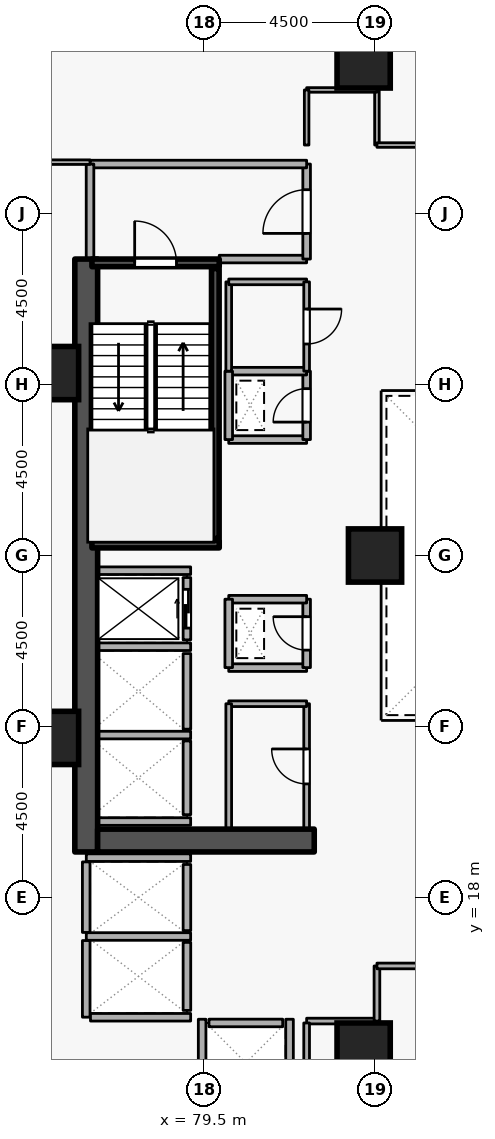
"""IFC4 building model, lengths in metres.
Left out: names, types, materials, properties, quantities, classifications, styles, units other than length and angle.
Written with IfcOpenShell. Run it as: python <this file> out.ifc"""

import sys

from ifc_helpers import new_model, si_unit, direction, frame, frame_2d, origin, origin_2d, place, context, subcontext, project, spatial, rectangle, extrude, element, fill, save


model = new_model("IFC4")
c1 = context("Model", 3, precision=1e-05, world=origin(), true_north=direction((0.0, 1.0)))
c2 = subcontext(c1, "Body", "Model", "MODEL_VIEW")
j1 = project(units=[si_unit("LENGTHUNIT", "METRE"), si_unit("PLANEANGLEUNIT", "RADIAN")], contexts=[c1])
p1 = place(None, origin())
s1 = spatial("IfcSite", under=j1, at=p1, CompositionType="ELEMENT")
p2 = place(p1, origin())
s2 = spatial("IfcBuilding", under=s1, at=p2, CompositionType="ELEMENT")
p3 = place(p2, frame((0.0, 0.0, 57.3)))
s3 = spatial("IfcBuildingStorey", under=s2, at=p3, CompositionType="ELEMENT", Elevation=57.3)
p4 = place(p3, frame((76.4, 19.2, 0.0), z_axis=(0.0, 0.0, 1.0), x_axis=(0.0, 1.0, 0.0)))
e1 = element("IfcWall", 1, at=p4, inside=s3, PredefinedType="SHEAR", context=c2, shape_type="SweptSolid", body=[
    extrude(rectangle(XDim=15.6, YDim=0.6, at=frame_2d((7.8, 0.0))), origin(), (0.0, 0.0, 1.0), 3.6),
])
p5 = place(p3, frame((76.7, 19.5, 0.0), z_axis=(0.0, 0.0, 1.0), x_axis=(1.0, 0.0, 0.0)))
e2 = element("IfcWall", 2, at=p5, inside=s3, PredefinedType="SHEAR", context=c2, shape_type="SweptSolid", body=[
    extrude(rectangle(XDim=5.7, YDim=0.6, at=frame_2d((2.85, 0.0))), origin(), (0.0, 0.0, 1.0), 3.6),
])
for number, where, z_axis, x_axis in (
    (3, (83.7, 14.0, 0.0), (0.0, 0.0, 1.0), (1.0, 0.0, 0.0)),
    (4, (83.7, 40.0, 0.0), (0.0, 0.0, 1.0), (1.0, 0.0, 0.0)),
    (5, (75.5, 22.2, 0.0), (0.0, 0.0, 1.0), (1.0, 0.0, 0.0)),
    (6, (75.5, 31.8, 0.0), (0.0, 0.0, 1.0), (1.0, 0.0, 0.0)),
    (7, (84.0, 27.0, 0.0), (0.0, 0.0, 1.0), (1.0, 0.0, 0.0)),
):
    element("IfcColumn", number, at=place(p3, frame(where, z_axis=z_axis, x_axis=x_axis)), inside=s3, PredefinedType="COLUMN", context=c2, shape_type="SweptSolid", body=[
        extrude(rectangle(XDim=1.4, YDim=1.4, at=origin_2d()), origin(), (0.0, 0.0, 1.0), 3.6),
    ])
p6 = place(p3, frame((79.05, 24.78, 0.0), z_axis=(0.0, 0.0, 1.0), x_axis=(0.0, 1.0, 0.0)))
e8 = element("IfcWall", 8, at=p6, inside=s3, PredefinedType="STANDARD", context=c2, shape_type="SweptSolid", body=[
    extrude(rectangle(XDim=1.64, YDim=0.2, at=frame_2d((0.82, 0.0))), origin(), (0.0, 0.0, 1.0), 3.34),
])
p7 = place(p6, frame((0.31, 0.0, 0.0)))
e9 = element("IfcOpeningElement", 9, at=p7, cuts=e8, PredefinedType="OPENING", context=c2, shape_type="SweptSolid", body=[
    extrude(rectangle(XDim=1.02, YDim=2.06, at=frame_2d((0.51, 1.03))), frame((0.0, 0.11, 0.0), z_axis=(0.0, -1.0, 0.0), x_axis=(1.0, 0.0, 0.0)), (0.0, 0.0, 1.0), 0.22),
])
p8 = place(p3, frame((79.05, 22.43, 0.0), z_axis=(0.0, 0.0, 1.0), x_axis=(0.0, 1.0, 0.0)))
e10 = element("IfcWall", 10, at=p8, inside=s3, PredefinedType="STANDARD", context=c2, shape_type="SweptSolid", body=[
    extrude(rectangle(XDim=1.99, YDim=0.2, at=frame_2d((0.995, 0.0))), origin(), (0.0, 0.0, 1.0), 3.34),
])
p9 = place(p3, frame((79.05, 20.18, 0.0), z_axis=(0.0, 0.0, 1.0), x_axis=(0.0, 1.0, 0.0)))
e11 = element("IfcWall", 11, at=p9, inside=s3, PredefinedType="STANDARD", context=c2, shape_type="SweptSolid", body=[
    extrude(rectangle(XDim=1.94, YDim=0.2, at=frame_2d((0.97, 0.0))), origin(), (0.0, 0.0, 1.0), 3.34),
])
p10 = place(p3, frame((79.05, 17.13, 0.0), z_axis=(0.0, 0.0, 1.0), x_axis=(0.0, 1.0, 0.0)))
e12 = element("IfcWall", 12, at=p10, inside=s3, PredefinedType="STANDARD", context=c2, shape_type="SweptSolid", body=[
    extrude(rectangle(XDim=1.74, YDim=0.2, at=frame_2d((0.87, 0.0))), origin(), (0.0, 0.0, 1.0), 3.34),
])
p11 = place(p3, frame((79.05, 15.03, 0.0), z_axis=(0.0, 0.0, 1.0), x_axis=(0.0, 1.0, 0.0)))
e13 = element("IfcWall", 13, at=p11, inside=s3, PredefinedType="STANDARD", context=c2, shape_type="SweptSolid", body=[
    extrude(rectangle(XDim=1.79, YDim=0.2, at=frame_2d((0.895, 0.0))), origin(), (0.0, 0.0, 1.0), 3.34),
])
p12 = place(p3, frame((79.63, 14.7, 0.0), z_axis=(0.0, 0.0, 1.0), x_axis=(1.0, 0.0, 0.0)))
e14 = element("IfcWall", 14, at=p12, inside=s3, PredefinedType="STANDARD", context=c2, shape_type="SweptSolid", body=[
    extrude(rectangle(XDim=1.94, YDim=0.2, at=frame_2d((0.97, 0.0))), origin(), (0.0, 0.0, 1.0), 3.34),
])
for number, where, z_axis, x_axis in (
    (15, (76.712, 26.6, 0.0), (0.0, 0.0, 1.0), (1.0, 0.0, 0.0)),
    (16, (76.712, 24.6, 0.0), (0.0, 0.0, 1.0), (1.0, 0.0, 0.0)),
    (17, (76.712, 22.275, 0.0), (0.0, 0.0, 1.0), (1.0, 0.0, 0.0)),
    (18, (76.712, 20.0, 0.0), (0.0, 0.0, 1.0), (1.0, 0.0, 0.0)),
):
    element("IfcWall", number, at=place(p3, frame(where, z_axis=z_axis, x_axis=x_axis)), inside=s3, PredefinedType="STANDARD", context=c2, shape_type="SweptSolid", body=[
        extrude(rectangle(XDim=2.436, YDim=0.2, at=frame_2d((1.218, 0.0))), origin(), (0.0, 0.0, 1.0), 3.34),
    ])
p13 = place(p3, frame((76.402, 19.05, 0.0), z_axis=(0.0, 0.0, 1.0), x_axis=(1.0, 0.0, 0.0)))
e19 = element("IfcWall", 19, at=p13, inside=s3, PredefinedType="STANDARD", context=c2, shape_type="SweptSolid", body=[
    extrude(rectangle(XDim=2.746, YDim=0.2, at=frame_2d((1.373, 0.0))), origin(), (0.0, 0.0, 1.0), 2.545),
])
p14 = place(p3, frame((76.402, 16.975, 0.0), z_axis=(0.0, 0.0, 1.0), x_axis=(1.0, 0.0, 0.0)))
e20 = element("IfcWall", 20, at=p14, inside=s3, PredefinedType="STANDARD", context=c2, shape_type="SweptSolid", body=[
    extrude(rectangle(XDim=2.746, YDim=0.2, at=frame_2d((1.373, 0.0))), origin(), (0.0, 0.0, 1.0), 3.34),
])
p15 = place(p3, frame((76.4, 14.852, 0.0), z_axis=(0.0, 0.0, 1.0), x_axis=(0.0, 1.0, 0.0)))
e21 = element("IfcWall", 21, at=p15, inside=s3, PredefinedType="STANDARD", context=c2, shape_type="SweptSolid", body=[
    extrude(rectangle(XDim=2.016, YDim=0.2, at=frame_2d((1.008, 0.0))), origin(), (0.0, 0.0, 1.0), 3.34),
])
p16 = place(p3, frame((76.4, 17.082, 0.0), z_axis=(0.0, 0.0, 1.0), x_axis=(0.0, 1.0, 0.0)))
e22 = element("IfcWall", 22, at=p16, inside=s3, PredefinedType="STANDARD", context=c2, shape_type="SweptSolid", body=[
    extrude(rectangle(XDim=1.856, YDim=0.2, at=frame_2d((0.928, 0.0))), origin(), (0.0, 0.0, 1.0), 3.34),
])
p17 = place(p3, frame((76.512, 14.85, 0.0), z_axis=(0.0, 0.0, 1.0), x_axis=(1.0, 0.0, 0.0)))
e23 = element("IfcWall", 23, at=p17, inside=s3, PredefinedType="STANDARD", context=c2, shape_type="SweptSolid", body=[
    extrude(rectangle(XDim=2.636, YDim=0.2, at=frame_2d((1.318, 0.0))), origin(), (0.0, 0.0, 1.0), 3.34),
])
for number, where, z_axis, x_axis in (
    (24, (81.75, 12.612, 0.0), (0.0, 0.0, 1.0), (0.0, 1.0, 0.0)),
    (25, (79.45, 12.612, 0.0), (0.0, 0.0, 1.0), (0.0, 1.0, 0.0)),
):
    element("IfcWall", number, at=place(p3, frame(where, z_axis=z_axis, x_axis=x_axis)), inside=s3, PredefinedType="STANDARD", context=c2, shape_type="SweptSolid", body=[
        extrude(rectangle(XDim=2.186, YDim=0.2, at=frame_2d((1.093, 0.0))), origin(), (0.0, 0.0, 1.0), 3.34),
    ])
p18 = place(p3, frame((76.55, 34.7, 0.0), z_axis=(0.0, 0.0, 1.0), x_axis=(1.0, 0.0, 0.0)))
e26 = element("IfcWall", 26, at=p18, inside=s3, PredefinedType="SHEAR", context=c2, shape_type="SweptSolid", body=[
    extrude(rectangle(XDim=3.35, YDim=0.2, at=frame_2d((1.675, 0.0))), origin(), (0.0, 0.0, 1.0), 3.6),
])
p19 = place(p18, frame((1.125, 0.0, 0.0)))
e27 = element("IfcOpeningElement", 27, at=p19, cuts=e26, PredefinedType="OPENING", context=c2, shape_type="SweptSolid", body=[
    extrude(rectangle(XDim=1.1, YDim=2.1, at=frame_2d((0.55, 1.05))), frame((0.0, 0.11, 0.0), z_axis=(0.0, -1.0, 0.0), x_axis=(1.0, 0.0, 0.0)), (0.0, 0.0, 1.0), 0.22),
])
p20 = place(p3, frame((79.9, 27.3, 0.0), z_axis=(0.0, 0.0, 1.0), x_axis=(-1.0, 0.0, 0.0)))
e28 = element("IfcWall", 28, at=p20, inside=s3, PredefinedType="SHEAR", context=c2, shape_type="SweptSolid", body=[
    extrude(rectangle(XDim=3.35, YDim=0.2, at=frame_2d((1.675, 0.0))), origin(), (0.0, 0.0, 1.0), 3.6),
])
p21 = place(p3, frame((79.797, 27.45, 0.0), z_axis=(0.0, 0.0, 1.0), x_axis=(0.0, 1.0, 0.0)))
e29 = element("IfcWall", 29, at=p21, inside=s3, PredefinedType="SHEAR", context=c2, shape_type="SweptSolid", body=[
    extrude(rectangle(XDim=7.1, YDim=0.2, at=frame_2d((3.55, 0.0))), origin(), (0.0, 0.0, 1.0), 3.6),
])
p22 = place(p3, frame((79.9, 34.8, 0.0), z_axis=(0.0, 0.0, 1.0), x_axis=(1.0, 0.0, 0.0)))
e30 = element("IfcWall", 30, at=p22, inside=s3, PredefinedType="STANDARD", context=c2, shape_type="SweptSolid", body=[
    extrude(rectangle(XDim=2.3, YDim=0.2, at=frame_2d((1.15, 0.0))), origin(), (0.0, 0.0, 1.0), 2.545),
])
p23 = place(p3, frame((82.2, 34.8, 0.0), z_axis=(0.0, 0.0, 1.0), x_axis=(0.0, 1.0, 0.0)))
e31 = element("IfcWall", 31, at=p23, inside=s3, PredefinedType="STANDARD", context=c2, shape_type="SweptSolid", body=[
    extrude(rectangle(XDim=2.5, YDim=0.2, at=frame_2d((1.25, 0.0))), origin(), (0.0, 0.0, 1.0), 3.34),
])
p24 = place(p23, frame((0.675, 0.0, 0.0)))
e32 = element("IfcOpeningElement", 32, at=p24, cuts=e31, PredefinedType="OPENING", context=c2, shape_type="SweptSolid", body=[
    extrude(rectangle(XDim=1.15, YDim=2.1, at=frame_2d((0.575, 1.05))), frame((0.0, 0.11, 0.0), z_axis=(0.0, -1.0, 0.0), x_axis=(1.0, 0.0, 0.0)), (0.0, 0.0, 1.0), 0.22),
])
p25 = place(p3, frame((82.2, 37.3, 0.0), z_axis=(0.0, 0.0, 1.0), x_axis=(-1.0, 0.0, 0.0)))
e33 = element("IfcWall", 33, at=p25, inside=s3, PredefinedType="STANDARD", context=c2, shape_type="SweptSolid", body=[
    extrude(rectangle(XDim=5.7, YDim=0.2, at=frame_2d((2.85, 0.0))), origin(), (0.0, 0.0, 1.0), 3.34),
])
p26 = place(p3, frame((76.5, 37.3, 0.0), z_axis=(0.0, 0.0, 1.0), x_axis=(0.0, -1.0, 0.0)))
e34 = element("IfcWall", 34, at=p26, inside=s3, PredefinedType="STANDARD", context=c2, shape_type="SweptSolid", body=[
    extrude(rectangle(XDim=2.5, YDim=0.2, at=frame_2d((1.25, 0.0))), origin(), (0.0, 0.0, 1.0), 3.34),
])
p27 = place(p3, frame((80.15, 24.05, 0.0), z_axis=(0.0, 0.0, 1.0), x_axis=(1.0, 0.0, 0.0)))
e35 = element("IfcWall", 35, at=p27, inside=s3, PredefinedType="STANDARD", context=c2, shape_type="SweptSolid", body=[
    extrude(rectangle(XDim=2.05, YDim=0.2, at=frame_2d((1.025, 0.0))), origin(), (0.0, 0.0, 1.0), 3.34),
])
p28 = place(p3, frame((82.2, 24.05, 0.0), z_axis=(0.0, 0.0, 1.0), x_axis=(0.0, 1.0, 0.0)))
e36 = element("IfcWall", 36, at=p28, inside=s3, PredefinedType="STANDARD", context=c2, shape_type="SweptSolid", body=[
    extrude(rectangle(XDim=1.8, YDim=0.2, at=frame_2d((0.9, 0.0))), origin(), (0.0, 0.0, 1.0), 3.34),
])
p29 = place(p28, frame((0.46, 0.0, 0.0)))
e37 = element("IfcOpeningElement", 37, at=p29, cuts=e36, PredefinedType="OPENING", context=c2, shape_type="SweptSolid", body=[
    extrude(rectangle(XDim=0.88, YDim=2.04, at=frame_2d((0.44, 1.02))), frame((0.0, 0.11, 0.0), z_axis=(0.0, -1.0, 0.0), x_axis=(1.0, 0.0, 0.0)), (0.0, 0.0, 1.0), 0.22),
])
p30 = place(p3, frame((82.2, 25.85, 0.0), z_axis=(0.0, 0.0, 1.0), x_axis=(-1.0, 0.0, 0.0)))
e38 = element("IfcWall", 38, at=p30, inside=s3, PredefinedType="STANDARD", context=c2, shape_type="SweptSolid", body=[
    extrude(rectangle(XDim=2.05, YDim=0.2, at=frame_2d((1.025, 0.0))), origin(), (0.0, 0.0, 1.0), 3.34),
])
p31 = place(p3, frame((80.15, 25.85, 0.0), z_axis=(0.0, 0.0, 1.0), x_axis=(0.0, -1.0, 0.0)))
e39 = element("IfcWall", 39, at=p31, inside=s3, PredefinedType="STANDARD", context=c2, shape_type="SweptSolid", body=[
    extrude(rectangle(XDim=1.8, YDim=0.2, at=frame_2d((0.9, 0.0))), origin(), (0.0, 0.0, 1.0), 3.34),
])
p32 = place(p3, frame((80.15, 30.05, 0.0), z_axis=(0.0, 0.0, 1.0), x_axis=(1.0, 0.0, 0.0)))
e40 = element("IfcWall", 40, at=p32, inside=s3, PredefinedType="STANDARD", context=c2, shape_type="SweptSolid", body=[
    extrude(rectangle(XDim=2.05, YDim=0.2, at=frame_2d((1.025, 0.0))), origin(), (0.0, 0.0, 1.0), 3.34),
])
p33 = place(p3, frame((82.2, 30.05, 0.0), z_axis=(0.0, 0.0, 1.0), x_axis=(0.0, 1.0, 0.0)))
e41 = element("IfcWall", 41, at=p33, inside=s3, PredefinedType="STANDARD", context=c2, shape_type="SweptSolid", body=[
    extrude(rectangle(XDim=1.8, YDim=0.2, at=frame_2d((0.9, 0.0))), origin(), (0.0, 0.0, 1.0), 3.34),
])
p34 = place(p33, frame((0.46, 0.0, 0.0)))
e42 = element("IfcOpeningElement", 42, at=p34, cuts=e41, PredefinedType="OPENING", context=c2, shape_type="SweptSolid", body=[
    extrude(rectangle(XDim=0.88, YDim=2.04, at=frame_2d((0.44, 1.02))), frame((0.0, 0.11, 0.0), z_axis=(0.0, -1.0, 0.0), x_axis=(1.0, 0.0, 0.0)), (0.0, 0.0, 1.0), 0.22),
])
p35 = place(p3, frame((82.2, 31.85, 0.0), z_axis=(0.0, 0.0, 1.0), x_axis=(-1.0, 0.0, 0.0)))
e43 = element("IfcWall", 43, at=p35, inside=s3, PredefinedType="STANDARD", context=c2, shape_type="SweptSolid", body=[
    extrude(rectangle(XDim=2.05, YDim=0.2, at=frame_2d((1.025, 0.0))), origin(), (0.0, 0.0, 1.0), 3.34),
])
p36 = place(p3, frame((80.15, 31.85, 0.0), z_axis=(0.0, 0.0, 1.0), x_axis=(0.0, -1.0, 0.0)))
e44 = element("IfcWall", 44, at=p36, inside=s3, PredefinedType="STANDARD", context=c2, shape_type="SweptSolid", body=[
    extrude(rectangle(XDim=1.8, YDim=0.2, at=frame_2d((0.9, 0.0))), origin(), (0.0, 0.0, 1.0), 3.34),
])
p37 = place(p3, frame((82.2, 19.8, 0.0), z_axis=(0.0, 0.0, 1.0), x_axis=(0.0, 1.0, 0.0)))
e45 = element("IfcWall", 45, at=p37, inside=s3, PredefinedType="PARTITIONING", context=c2, shape_type="SweptSolid", body=[
    extrude(rectangle(XDim=3.3, YDim=0.15, at=frame_2d((1.65, 0.0))), origin(), (0.0, 0.0, 1.0), 3.34),
])
p38 = place(p37, frame((1.19, 0.0, 0.0)))
e46 = element("IfcOpeningElement", 46, at=p38, cuts=e45, PredefinedType="OPENING", context=c2, shape_type="SweptSolid", body=[
    extrude(rectangle(XDim=0.92, YDim=2.08, at=frame_2d((0.46, 1.04))), frame((0.0, 0.085, 0.0), z_axis=(0.0, -1.0, 0.0), x_axis=(1.0, 0.0, 0.0)), (0.0, 0.0, 1.0), 0.17),
])
p39 = place(p3, frame((82.2, 23.1, 0.0), z_axis=(0.0, 0.0, 1.0), x_axis=(-1.0, 0.0, 0.0)))
e47 = element("IfcWall", 47, at=p39, inside=s3, PredefinedType="PARTITIONING", context=c2, shape_type="SweptSolid", body=[
    extrude(rectangle(XDim=2.05, YDim=0.15, at=frame_2d((1.025, 0.0))), origin(), (0.0, 0.0, 1.0), 3.34),
])
p40 = place(p3, frame((80.15, 23.1, 0.0), z_axis=(0.0, 0.0, 1.0), x_axis=(0.0, -1.0, 0.0)))
e48 = element("IfcWall", 48, at=p40, inside=s3, PredefinedType="PARTITIONING", context=c2, shape_type="SweptSolid", body=[
    extrude(rectangle(XDim=3.3, YDim=0.15, at=frame_2d((1.65, 0.0))), origin(), (0.0, 0.0, 1.0), 3.34),
])
p41 = place(p3, frame((80.15, 31.85, 0.0), z_axis=(0.0, 0.0, 1.0), x_axis=(0.0, 1.0, 0.0)))
e49 = element("IfcWall", 49, at=p41, inside=s3, PredefinedType="PARTITIONING", context=c2, shape_type="SweptSolid", body=[
    extrude(rectangle(XDim=2.35, YDim=0.15, at=frame_2d((1.175, 0.0))), origin(), (0.0, 0.0, 1.0), 3.34),
])
p42 = place(p3, frame((80.15, 34.2, 0.0), z_axis=(0.0, 0.0, 1.0), x_axis=(1.0, 0.0, 0.0)))
e50 = element("IfcWall", 50, at=p42, inside=s3, PredefinedType="PARTITIONING", context=c2, shape_type="SweptSolid", body=[
    extrude(rectangle(XDim=2.05, YDim=0.15, at=frame_2d((1.025, 0.0))), origin(), (0.0, 0.0, 1.0), 2.545),
])
p43 = place(p3, frame((82.2, 34.2, 0.0), z_axis=(0.0, 0.0, 1.0), x_axis=(0.0, -1.0, 0.0)))
e51 = element("IfcWall", 51, at=p43, inside=s3, PredefinedType="PARTITIONING", context=c2, shape_type="SweptSolid", body=[
    extrude(rectangle(XDim=2.35, YDim=0.15, at=frame_2d((1.175, 0.0))), origin(), (0.0, 0.0, 1.0), 3.34),
])
p44 = place(p43, frame((0.715, 0.0, 0.0)))
e52 = element("IfcOpeningElement", 52, at=p44, cuts=e51, PredefinedType="OPENING", context=c2, shape_type="SweptSolid", body=[
    extrude(rectangle(XDim=0.92, YDim=2.08, at=frame_2d((0.46, 1.04))), frame((0.0, 0.085, 0.0), z_axis=(0.0, -1.0, 0.0), x_axis=(1.0, 0.0, 0.0)), (0.0, 0.0, 1.0), 0.17),
])
p45 = place(p3, frame((82.2, 14.75, 0.0), z_axis=(0.0, 0.0, 1.0), x_axis=(1.0, 0.0, 0.0)))
e53 = element("IfcWall", 53, at=p45, inside=s3, PredefinedType="PARTITIONING", context=c2, shape_type="SweptSolid", body=[
    extrude(rectangle(XDim=1.85, YDim=0.15, at=frame_2d((0.925, 0.0))), origin(), (0.0, 0.0, 1.0), 3.34),
])
p46 = place(p3, frame((84.05, 14.75, 0.0), z_axis=(0.0, 0.0, 1.0), x_axis=(0.0, 1.0, 0.0)))
e54 = element("IfcWall", 54, at=p46, inside=s3, PredefinedType="PARTITIONING", context=c2, shape_type="SweptSolid", body=[
    extrude(rectangle(XDim=1.45, YDim=0.15, at=frame_2d((0.725, 0.0))), origin(), (0.0, 0.0, 1.0), 3.34),
])
p47 = place(p3, frame((84.05, 16.2, 0.0), z_axis=(0.0, 0.0, 1.0), x_axis=(1.0, 0.0, 0.0)))
e55 = element("IfcWall", 55, at=p47, inside=s3, PredefinedType="PARTITIONING", context=c2, shape_type="SweptSolid", body=[
    extrude(rectangle(XDim=4.45, YDim=0.15, at=frame_2d((2.225, 0.0))), origin(), (0.0, 0.0, 1.0), 3.34),
])
p48 = place(p47, frame((1.575, 0.0, 0.0)))
e56 = element("IfcOpeningElement", 56, at=p48, cuts=e55, PredefinedType="OPENING", context=c2, shape_type="SweptSolid", body=[
    extrude(rectangle(XDim=1.3, YDim=2.12, at=frame_2d((0.65, 1.06))), frame((0.0, 0.085, 0.0), z_axis=(0.0, -1.0, 0.0), x_axis=(1.0, 0.0, 0.0)), (0.0, 0.0, 1.0), 0.17),
])
p49 = place(p3, frame((82.2, 12.4, 0.0), z_axis=(0.0, 0.0, 1.0), x_axis=(0.0, 1.0, 0.0)))
e57 = element("IfcWall", 57, at=p49, inside=s3, PredefinedType="PARTITIONING", context=c2, shape_type="SweptSolid", body=[
    extrude(rectangle(XDim=2.3, YDim=0.15, at=frame_2d((1.15, 0.0))), origin(), (0.0, 0.0, 1.0), 3.34),
])
p50 = place(p3, frame((84.05, 37.8, 0.0), z_axis=(0.0, 0.0, 1.0), x_axis=(0.0, 1.0, 0.0)))
e58 = element("IfcWall", 58, at=p50, inside=s3, PredefinedType="PARTITIONING", context=c2, shape_type="SweptSolid", body=[
    extrude(rectangle(XDim=1.45, YDim=0.12, at=frame_2d((0.725, 0.0))), origin(), (0.0, 0.0, 1.0), 3.34),
])
p51 = place(p3, frame((84.05, 39.25, 0.0), z_axis=(0.0, 0.0, 1.0), x_axis=(-1.0, 0.0, 0.0)))
e59 = element("IfcWall", 59, at=p51, inside=s3, PredefinedType="PARTITIONING", context=c2, shape_type="SweptSolid", body=[
    extrude(rectangle(XDim=1.85, YDim=0.12, at=frame_2d((0.925, 0.0))), origin(), (0.0, 0.0, 1.0), 3.34),
])
p52 = place(p3, frame((82.2, 39.25, 0.0), z_axis=(0.0, 0.0, 1.0), x_axis=(0.0, -1.0, 0.0)))
e60 = element("IfcWall", 60, at=p52, inside=s3, PredefinedType="PARTITIONING", context=c2, shape_type="SweptSolid", body=[
    extrude(rectangle(XDim=1.45, YDim=0.12, at=frame_2d((0.725, 0.0))), origin(), (0.0, 0.0, 1.0), 3.34),
])
p53 = place(p3, frame((76.5, 37.35, 0.0), z_axis=(0.0, 0.0, 1.0), x_axis=(-1.0, 0.0, 0.0)))
e61 = element("IfcWall", 61, at=p53, inside=s3, PredefinedType="PARTITIONING", context=c2, shape_type="SweptSolid", body=[
    extrude(rectangle(XDim=6.22, YDim=0.12, at=frame_2d((3.11, 0.0))), origin(), (0.0, 0.0, 1.0), 3.34),
])
p54 = place(p3, frame((88.5, 37.8, 0.0), z_axis=(0.0, 0.0, 1.0), x_axis=(-1.0, 0.0, 0.0)))
e62 = element("IfcWall", 62, at=p54, inside=s3, PredefinedType="PARTITIONING", context=c2, shape_type="SweptSolid", body=[
    extrude(rectangle(XDim=4.45, YDim=0.12, at=frame_2d((2.225, 0.0))), origin(), (0.0, 0.0, 1.0), 3.34),
])
p55 = place(p54, frame((1.7, 0.0, 0.0)))
e63 = element("IfcOpeningElement", 63, at=p55, cuts=e62, PredefinedType="OPENING", context=c2, shape_type="SweptSolid", body=[
    extrude(rectangle(XDim=1.05, YDim=2.1, at=frame_2d((0.525, 1.05))), frame((0.0, 0.07, 0.0), z_axis=(0.0, -1.0, 0.0), x_axis=(1.0, 0.0, 0.0)), (0.0, 0.0, 1.0), 0.14),
])
p56 = place(p7, origin())
e64 = element("IfcDoor", 64, at=p56, inside=s3, OperationType="SLIDING_TO_LEFT", PredefinedType="DOOR", context=c2, shape_type="SweptSolid", body=[
    extrude(rectangle(XDim=1.02, YDim=2.06, at=frame_2d((0.51, 1.03))), frame((0.0, 0.025, 0.0), z_axis=(0.0, -1.0, 0.0), x_axis=(1.0, 0.0, 0.0)), (0.0, 0.0, 1.0), 0.05),
])
fill(e9, e64)
p57 = place(p19, origin())
e65 = element("IfcDoor", 65, at=p57, inside=s3, OperationType="SINGLE_SWING_LEFT", PredefinedType="DOOR", context=c2, shape_type="SweptSolid", body=[
    extrude(rectangle(XDim=1.1, YDim=2.1, at=frame_2d((0.55, 1.05))), frame((0.0, 0.025, 0.0), z_axis=(0.0, -1.0, 0.0), x_axis=(1.0, 0.0, 0.0)), (0.0, 0.0, 1.0), 0.05),
])
fill(e27, e65)
p58 = place(p24, origin())
e66 = element("IfcDoor", 66, at=p58, inside=s3, OperationType="SINGLE_SWING_LEFT", PredefinedType="DOOR", context=c2, shape_type="SweptSolid", body=[
    extrude(rectangle(XDim=1.15, YDim=2.1, at=frame_2d((0.575, 1.05))), frame((0.0, 0.025, 0.0), z_axis=(0.0, -1.0, 0.0), x_axis=(1.0, 0.0, 0.0)), (0.0, 0.0, 1.0), 0.05),
])
fill(e32, e66)
p59 = place(p29, origin())
e67 = element("IfcDoor", 67, at=p59, inside=s3, OperationType="SINGLE_SWING_RIGHT", PredefinedType="DOOR", context=c2, shape_type="SweptSolid", body=[
    extrude(rectangle(XDim=0.88, YDim=2.04, at=frame_2d((0.44, 1.02))), frame((0.0, 0.025, 0.0), z_axis=(0.0, -1.0, 0.0), x_axis=(1.0, 0.0, 0.0)), (0.0, 0.0, 1.0), 0.05),
])
fill(e37, e67)
p60 = place(p34, origin())
e68 = element("IfcDoor", 68, at=p60, inside=s3, OperationType="SINGLE_SWING_LEFT", PredefinedType="DOOR", context=c2, shape_type="SweptSolid", body=[
    extrude(rectangle(XDim=0.88, YDim=2.04, at=frame_2d((0.44, 1.02))), frame((0.0, 0.025, 0.0), z_axis=(0.0, -1.0, 0.0), x_axis=(1.0, 0.0, 0.0)), (0.0, 0.0, 1.0), 0.05),
])
fill(e42, e68)
p61 = place(p38, origin())
e69 = element("IfcDoor", 69, at=p61, inside=s3, OperationType="SINGLE_SWING_RIGHT", PredefinedType="DOOR", context=c2, shape_type="SweptSolid", body=[
    extrude(rectangle(XDim=0.92, YDim=2.08, at=frame_2d((0.46, 1.04))), frame((0.0, 0.025, 0.0), z_axis=(0.0, -1.0, 0.0), x_axis=(1.0, 0.0, 0.0)), (0.0, 0.0, 1.0), 0.05),
])
fill(e46, e69)
p62 = place(p44, origin())
e70 = element("IfcDoor", 70, at=p62, inside=s3, OperationType="SINGLE_SWING_LEFT", PredefinedType="DOOR", context=c2, shape_type="SweptSolid", body=[
    extrude(rectangle(XDim=0.92, YDim=2.08, at=frame_2d((0.46, 1.04))), frame((0.0, 0.025, 0.0), z_axis=(0.0, -1.0, 0.0), x_axis=(1.0, 0.0, 0.0)), (0.0, 0.0, 1.0), 0.05),
])
fill(e52, e70)
save(model, sys.argv[1])
